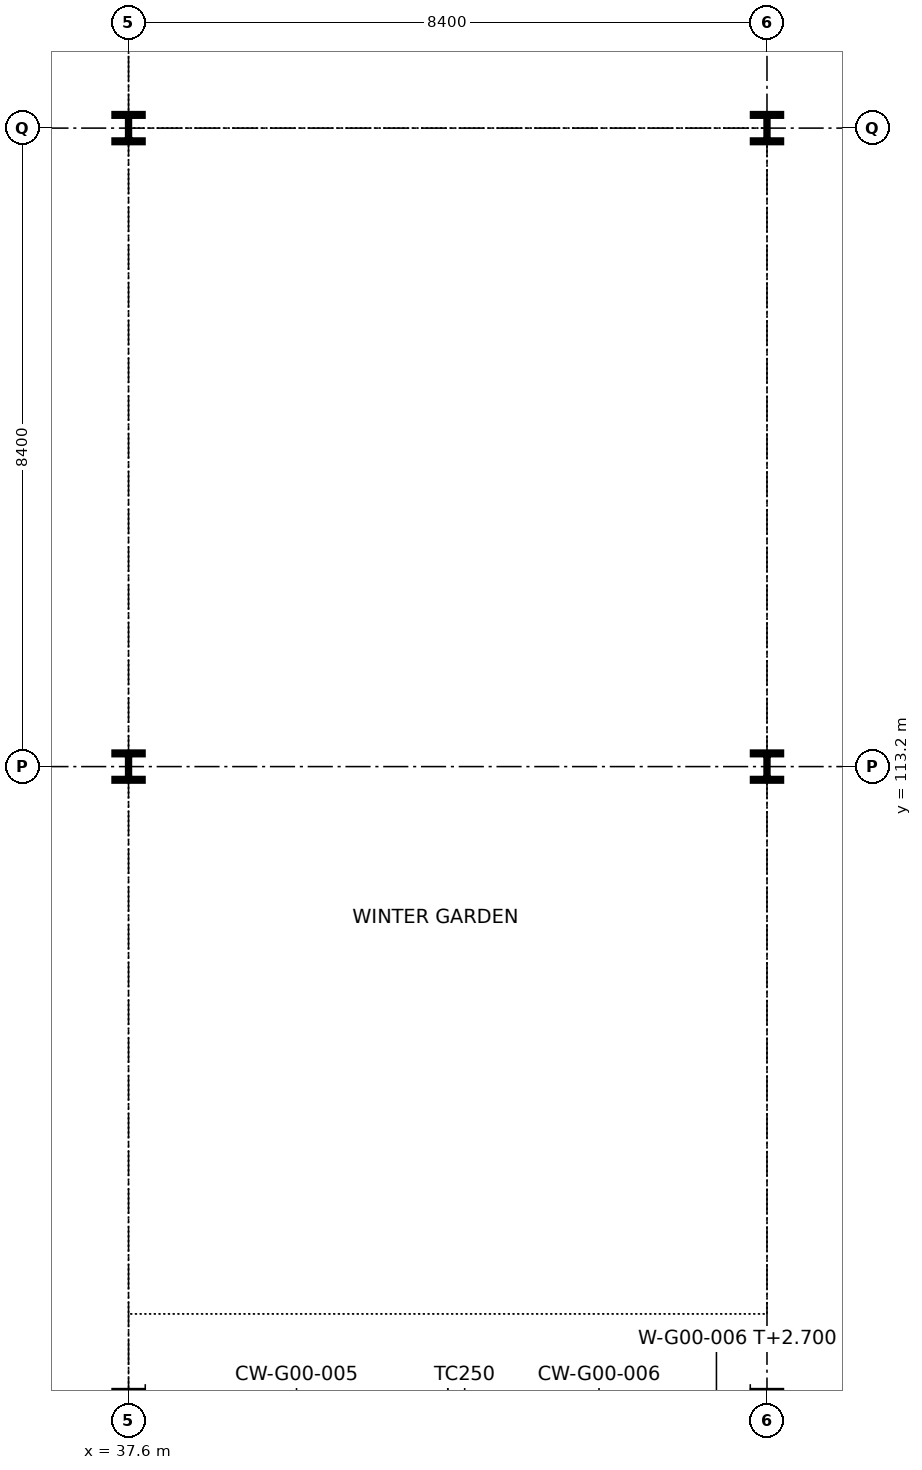
"""IFC4 building model, lengths in metres.
Left out: names, types, materials, properties, quantities, classifications, styles, units other than length and angle.
Written with IfcOpenShell. Run it as: python <this file> out.ifc"""

import sys

from ifc_helpers import new_model, si_unit, direction, frame, origin, origin_2d, place, context, subcontext, project, spatial, i_section, extrude, element, save


model = new_model("IFC4")
c1 = context("Model", 3, precision=1e-05, world=origin(), true_north=direction((0.0, 1.0)))
c2 = subcontext(c1, "Body", "Model", "MODEL_VIEW")
j1 = project(units=[si_unit("LENGTHUNIT", "METRE"), si_unit("PLANEANGLEUNIT", "RADIAN")], contexts=[c1])
p1 = place(None, origin())
s1 = spatial("IfcSite", under=j1, at=p1, CompositionType="ELEMENT")
p2 = place(p1, origin())
s2 = spatial("IfcBuilding", under=s1, at=p2, CompositionType="ELEMENT")
p3 = place(p2, origin())
s3 = spatial("IfcBuildingStorey", under=s2, at=p3, CompositionType="ELEMENT", Elevation=0.0)
for number, where, z_axis, x_axis in (
    (1, (37.6, 113.2, 0.0), (0.0, 0.0, 1.0), (1.0, 0.0, 0.0)),
    (2, (37.6, 121.6, 0.0), (0.0, 0.0, 1.0), (1.0, 0.0, 0.0)),
    (3, (46.0, 113.2, 0.0), (0.0, 0.0, 1.0), (1.0, 0.0, 0.0)),
    (4, (46.0, 121.6, 0.0), (0.0, 0.0, 1.0), (1.0, 0.0, 0.0)),
):
    element("IfcColumn", number, at=place(p3, frame(where, z_axis=z_axis, x_axis=x_axis)), inside=s3, PredefinedType="COLUMN", context=c2, shape_type="SweptSolid", body=[
        extrude(i_section(OverallWidth=0.373, OverallDepth=0.373, WebThickness=0.016, FlangeThickness=0.026, FilletRadius=0.015, at=origin_2d()), origin(), (0.0, 0.0, 1.0), 5.4),
    ])
save(model, sys.argv[1])
